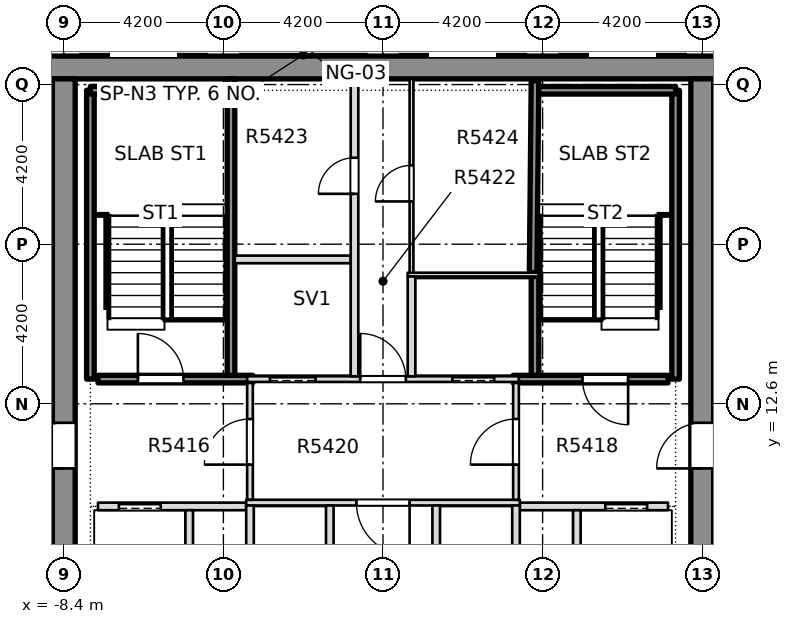
"""IFC4 building model, lengths in metres.
Left out: names, types, materials, properties, quantities, classifications, styles, units other than length and angle.
Written with IfcOpenShell. Run it as: python <this file> out.ifc"""

import sys

from ifc_helpers import new_model, si_unit, direction, frame, frame_2d, origin, place, context, subcontext, project, spatial, rectangle, extrude, element, fill, save


model = new_model("IFC4")
c1 = context("Model", 3, precision=1e-05, world=origin(), true_north=direction((0.0, 1.0)))
c2 = subcontext(c1, "Body", "Model", "MODEL_VIEW")
j1 = project(units=[si_unit("LENGTHUNIT", "METRE"), si_unit("PLANEANGLEUNIT", "RADIAN")], contexts=[c1])
p1 = place(None, origin())
s1 = spatial("IfcSite", under=j1, at=p1, CompositionType="ELEMENT")
p2 = place(p1, origin())
s2 = spatial("IfcBuilding", under=s1, at=p2, CompositionType="ELEMENT")
p3 = place(p2, frame((0.0, 0.0, 206.6)))
s3 = spatial("IfcBuildingStorey", under=s2, at=p3, CompositionType="ELEMENT", Elevation=206.6)
p4 = place(p3, frame((-12.0, 21.45, -0.4), z_axis=(0.0, 0.0, 1.0), x_axis=(1.0, 0.0, 0.0)))
e1 = element("IfcWall", 1, at=p4, inside=s3, PredefinedType="SHEAR", context=c2, shape_type="SweptSolid", body=[
    extrude(rectangle(XDim=24.0, YDim=0.6, at=frame_2d((12.0, 0.0))), origin(), (0.0, 0.0, 1.0), 3.45),
])
p5 = place(p3, frame((-8.4, -7.8, -0.4), z_axis=(0.0, 0.0, 1.0), x_axis=(0.0, 1.0, 0.0)))
e2 = element("IfcWall", 2, at=p5, inside=s3, PredefinedType="SHEAR", context=c2, shape_type="SweptSolid", body=[
    extrude(rectangle(XDim=28.95, YDim=0.6, at=frame_2d((14.475, 0.0))), origin(), (0.0, 0.0, 1.0), 3.45),
])
p6 = place(p5, frame((18.7, 0.0, 0.4)))
e3 = element("IfcOpeningElement", 3, at=p6, cuts=e2, PredefinedType="OPENING", context=c2, shape_type="SweptSolid", body=[
    extrude(rectangle(XDim=1.2, YDim=2.1, at=frame_2d((0.6, 1.05))), frame((0.0, 0.31, 0.0), z_axis=(0.0, -1.0, 0.0), x_axis=(1.0, 0.0, 0.0)), (0.0, 0.0, 1.0), 0.62),
])
p7 = place(p3, frame((8.4, -7.8, -0.4), z_axis=(0.0, 0.0, 1.0), x_axis=(0.0, 1.0, 0.0)))
e4 = element("IfcWall", 4, at=p7, inside=s3, PredefinedType="SHEAR", context=c2, shape_type="SweptSolid", body=[
    extrude(rectangle(XDim=28.95, YDim=0.6, at=frame_2d((14.475, 0.0))), origin(), (0.0, 0.0, 1.0), 3.45),
])
p8 = place(p7, frame((18.7, 0.0, 0.4)))
e5 = element("IfcOpeningElement", 5, at=p8, cuts=e4, PredefinedType="OPENING", context=c2, shape_type="SweptSolid", body=[
    extrude(rectangle(XDim=1.2, YDim=2.1, at=frame_2d((0.6, 1.05))), frame((0.0, 0.31, 0.0), z_axis=(0.0, -1.0, 0.0), x_axis=(1.0, 0.0, 0.0)), (0.0, 0.0, 1.0), 0.62),
])
p9 = place(p3, frame((-7.5, 9.9, 0.0), z_axis=(0.0, 0.0, 1.0), x_axis=(1.0, 0.0, 0.0)))
e6 = element("IfcWall", 6, at=p9, inside=s3, PredefinedType="PARTITIONING", context=c2, shape_type="SweptSolid", body=[
    extrude(rectangle(XDim=3.9, YDim=0.2, at=frame_2d((1.95, 0.0))), origin(), (0.0, 0.0, 1.0), 3.05),
])
p10 = place(p9, frame((0.55, 0.0, 0.0)))
e7 = element("IfcOpeningElement", 7, at=p10, cuts=e6, PredefinedType="OPENING", context=c2, shape_type="SweptSolid", body=[
    extrude(rectangle(XDim=1.1, YDim=2.1, at=frame_2d((0.55, 1.05))), frame((0.0, 0.11, 0.0), z_axis=(0.0, -1.0, 0.0), x_axis=(1.0, 0.0, 0.0)), (0.0, 0.0, 1.0), 0.22),
])
p11 = place(p3, frame((3.6, 9.9, 0.0), z_axis=(0.0, 0.0, 1.0), x_axis=(1.0, 0.0, 0.0)))
e8 = element("IfcWall", 8, at=p11, inside=s3, PredefinedType="PARTITIONING", context=c2, shape_type="SweptSolid", body=[
    extrude(rectangle(XDim=3.9, YDim=0.2, at=frame_2d((1.95, 0.0))), origin(), (0.0, 0.0, 1.0), 3.05),
])
p12 = place(p11, frame((2.25, 0.0, 0.0)))
e9 = element("IfcOpeningElement", 9, at=p12, cuts=e8, PredefinedType="OPENING", context=c2, shape_type="SweptSolid", body=[
    extrude(rectangle(XDim=1.1, YDim=2.1, at=frame_2d((0.55, 1.05))), frame((0.0, 0.11, 0.0), z_axis=(0.0, -1.0, 0.0), x_axis=(1.0, 0.0, 0.0)), (0.0, 0.0, 1.0), 0.22),
])
p13 = place(p3, frame((-3.6, 10.0, 0.0), z_axis=(0.0, 0.0, 1.0), x_axis=(1.0, 0.0, 0.0)))
e10 = element("IfcWall", 10, at=p13, inside=s3, PredefinedType="PARTITIONING", context=c2, shape_type="SweptSolid", body=[
    extrude(rectangle(XDim=7.2, YDim=0.15, at=frame_2d((3.6, 0.0))), origin(), (0.0, 0.0, 1.0), 3.05),
])
p14 = place(p13, frame((2.9, 0.0, 0.0)))
e11 = element("IfcOpeningElement", 11, at=p14, cuts=e10, PredefinedType="OPENING", context=c2, shape_type="SweptSolid", body=[
    extrude(rectangle(XDim=1.4, YDim=2.1, at=frame_2d((0.7, 1.05))), frame((0.0, 0.085, 0.0), z_axis=(0.0, -1.0, 0.0), x_axis=(1.0, 0.0, 0.0)), (0.0, 0.0, 1.0), 0.17),
])
p15 = place(p3, frame((-7.5, 13.25, 0.0), z_axis=(0.0, 0.0, 1.0), x_axis=(1.0, 0.0, 0.0)))
e12 = element("IfcWall", 12, at=p15, inside=s3, PredefinedType="SOLIDWALL", context=c2, shape_type="SweptSolid", body=[
    extrude(rectangle(XDim=4.075, YDim=0.2, at=frame_2d((2.038, 0.0))), origin(), (0.0, 0.0, 1.0), 3.05),
])
p16 = place(p15, frame((1.05, 0.0, 0.0)))
e13 = element("IfcOpeningElement", 13, at=p16, cuts=e12, PredefinedType="OPENING", context=c2, shape_type="SweptSolid", body=[
    extrude(rectangle(XDim=1.2, YDim=2.1, at=frame_2d((0.6, 1.05))), frame((0.0, 0.11, 0.0), z_axis=(0.0, -1.0, 0.0), x_axis=(1.0, 0.0, 0.0)), (0.0, 0.0, 1.0), 0.22),
])
p17 = place(p3, frame((-3.575, 13.25, 0.0), z_axis=(0.0, 0.0, 1.0), x_axis=(1.0, 0.0, 0.0)))
e14 = element("IfcWall", 14, at=p17, inside=s3, PredefinedType="PARTITIONING", context=c2, shape_type="SweptSolid", body=[
    extrude(rectangle(XDim=7.15, YDim=0.15, at=frame_2d((3.575, 0.0))), origin(), (0.0, 0.0, 1.0), 3.05),
])
p18 = place(p17, frame((0.6, 0.0, 0.0)))
e15 = element("IfcOpeningElement", 15, at=p18, cuts=e14, PredefinedType="OPENING", context=c2, shape_type="SweptSolid", body=[
    extrude(rectangle(XDim=1.2, YDim=2.1, at=frame_2d((0.6, 1.05))), frame((0.0, 0.085, 0.0), z_axis=(0.0, -1.0, 0.0), x_axis=(1.0, 0.0, 0.0)), (0.0, 0.0, 1.0), 0.17),
])
p19 = place(p17, frame((5.4, 0.0, 0.0)))
e16 = element("IfcOpeningElement", 16, at=p19, cuts=e14, PredefinedType="OPENING", context=c2, shape_type="SweptSolid", body=[
    extrude(rectangle(XDim=1.1, YDim=2.1, at=frame_2d((0.55, 1.05))), frame((0.0, 0.085, 0.0), z_axis=(0.0, -1.0, 0.0), x_axis=(1.0, 0.0, 0.0)), (0.0, 0.0, 1.0), 0.17),
])
p20 = place(p17, frame((2.975, 0.0, 0.0)))
e17 = element("IfcOpeningElement", 17, at=p20, cuts=e14, PredefinedType="OPENING", context=c2, shape_type="SweptSolid", body=[
    extrude(rectangle(XDim=1.2, YDim=2.1, at=frame_2d((0.6, 1.05))), frame((0.0, 0.085, 0.0), z_axis=(0.0, -1.0, 0.0), x_axis=(1.0, 0.0, 0.0)), (0.0, 0.0, 1.0), 0.17),
])
p21 = place(p3, frame((3.425, 13.25, 0.0), z_axis=(0.0, 0.0, 1.0), x_axis=(1.0, 0.0, 0.0)))
e18 = element("IfcWall", 18, at=p21, inside=s3, PredefinedType="SOLIDWALL", context=c2, shape_type="SweptSolid", body=[
    extrude(rectangle(XDim=4.075, YDim=0.2, at=frame_2d((2.038, 0.0))), origin(), (0.0, 0.0, 1.0), 3.05),
])
p22 = place(p21, frame((1.825, 0.0, 0.0)))
e19 = element("IfcOpeningElement", 19, at=p22, cuts=e18, PredefinedType="OPENING", context=c2, shape_type="SweptSolid", body=[
    extrude(rectangle(XDim=1.2, YDim=2.1, at=frame_2d((0.6, 1.05))), frame((0.0, 0.11, 0.0), z_axis=(0.0, -1.0, 0.0), x_axis=(1.0, 0.0, 0.0)), (0.0, 0.0, 1.0), 0.22),
])
p23 = place(p3, frame((0.65, 16.0, 0.0), z_axis=(0.0, 0.0, 1.0), x_axis=(1.0, 0.0, 0.0)))
e20 = element("IfcWall", 20, at=p23, inside=s3, PredefinedType="PARTITIONING", context=c2, shape_type="SweptSolid", body=[
    extrude(rectangle(XDim=3.45, YDim=0.1, at=frame_2d((1.725, 0.0))), origin(), (0.0, 0.0, 1.0), 3.05),
])
p24 = place(p3, frame((-3.9, 16.4, 0.0), z_axis=(0.0, 0.0, 1.0), x_axis=(1.0, 0.0, 0.0)))
e21 = element("IfcWall", 21, at=p24, inside=s3, PredefinedType="PARTITIONING", context=c2, shape_type="SweptSolid", body=[
    extrude(rectangle(XDim=3.05, YDim=0.2, at=frame_2d((1.525, 0.0))), origin(), (0.0, 0.0, 1.0), 3.05),
])
p25 = place(p3, frame((-5.1, 7.075, 0.0), z_axis=(0.0, 0.0, 1.0), x_axis=(0.0, 1.0, 0.0)))
e22 = element("IfcWall", 22, at=p25, inside=s3, PredefinedType="PARTITIONING", context=c2, shape_type="SweptSolid", body=[
    extrude(rectangle(XDim=2.725, YDim=0.2, at=frame_2d((1.363, 0.0))), origin(), (0.0, 0.0, 1.0), 3.05),
])
p26 = place(p3, frame((-4.0, 13.35, 0.0), z_axis=(0.0, 0.0, 1.0), x_axis=(0.0, 1.0, 0.0)))
e23 = element("IfcWall", 23, at=p26, inside=s3, PredefinedType="SOLIDWALL", context=c2, shape_type="SweptSolid", body=[
    extrude(rectangle(XDim=7.799, YDim=0.2, at=frame_2d((3.899, 0.0))), origin(), (0.0, 0.0, 1.0), 3.05),
])
p27 = place(p3, frame((-3.5, 7.075, 0.0), z_axis=(0.0, 0.0, 1.0), x_axis=(0.0, 1.0, 0.0)))
e24 = element("IfcWall", 24, at=p27, inside=s3, PredefinedType="PARTITIONING", context=c2, shape_type="SweptSolid", body=[
    extrude(rectangle(XDim=2.85, YDim=0.2, at=frame_2d((1.425, 0.0))), origin(), (0.0, 0.0, 1.0), 3.05),
])
p28 = place(p3, frame((-3.5, 10.075, 0.0), z_axis=(0.0, 0.0, 1.0), x_axis=(0.0, 1.0, 0.0)))
e25 = element("IfcWall", 25, at=p28, inside=s3, PredefinedType="PARTITIONING", context=c2, shape_type="SweptSolid", body=[
    extrude(rectangle(XDim=3.075, YDim=0.15, at=frame_2d((1.538, 0.0))), origin(), (0.0, 0.0, 1.0), 3.05),
])
p29 = place(p28, frame((0.925, 0.0, 0.0)))
e26 = element("IfcOpeningElement", 26, at=p29, cuts=e25, PredefinedType="OPENING", context=c2, shape_type="SweptSolid", body=[
    extrude(rectangle(XDim=1.2, YDim=2.1, at=frame_2d((0.6, 1.05))), frame((0.0, 0.085, 0.0), z_axis=(0.0, -1.0, 0.0), x_axis=(1.0, 0.0, 0.0)), (0.0, 0.0, 1.0), 0.17),
])
p30 = place(p3, frame((-1.4, 7.075, 0.0), z_axis=(0.0, 0.0, 1.0), x_axis=(0.0, 1.0, 0.0)))
e27 = element("IfcWall", 27, at=p30, inside=s3, PredefinedType="PARTITIONING", context=c2, shape_type="SweptSolid", body=[
    extrude(rectangle(XDim=2.85, YDim=0.2, at=frame_2d((1.425, 0.0))), origin(), (0.0, 0.0, 1.0), 3.05),
])
p31 = place(p3, frame((-0.75, 13.325, 0.0), z_axis=(0.0, 0.0, 1.0), x_axis=(0.0, 1.0, 0.0)))
e28 = element("IfcWall", 28, at=p31, inside=s3, PredefinedType="PARTITIONING", context=c2, shape_type="SweptSolid", body=[
    extrude(rectangle(XDim=7.824, YDim=0.2, at=frame_2d((3.912, 0.0))), origin(), (0.0, 0.0, 1.0), 3.05),
])
p32 = place(p31, frame((4.8, 0.0, 0.0)))
e29 = element("IfcOpeningElement", 29, at=p32, cuts=e28, PredefinedType="OPENING", context=c2, shape_type="SweptSolid", body=[
    extrude(rectangle(XDim=0.95, YDim=2.1, at=frame_2d((0.475, 1.05))), frame((0.0, 0.11, 0.0), z_axis=(0.0, -1.0, 0.0), x_axis=(1.0, 0.0, 0.0)), (0.0, 0.0, 1.0), 0.22),
])
p33 = place(p3, frame((0.75, 13.325, 0.0), z_axis=(0.0, 0.0, 1.0), x_axis=(0.0, 1.0, 0.0)))
e30 = element("IfcWall", 30, at=p33, inside=s3, PredefinedType="PARTITIONING", context=c2, shape_type="SweptSolid", body=[
    extrude(rectangle(XDim=2.625, YDim=0.2, at=frame_2d((1.312, 0.0))), origin(), (0.0, 0.0, 1.0), 3.05),
])
p34 = place(p3, frame((0.75, 16.05, 0.0), z_axis=(0.0, 0.0, 1.0), x_axis=(0.0, 1.0, 0.0)))
e31 = element("IfcWall", 31, at=p34, inside=s3, PredefinedType="PARTITIONING", context=c2, shape_type="SweptSolid", body=[
    extrude(rectangle(XDim=5.099, YDim=0.1, at=frame_2d((2.549, 0.0))), origin(), (0.0, 0.0, 1.0), 3.05),
])
p35 = place(p34, frame((1.875, 0.0, 0.0)))
e32 = element("IfcOpeningElement", 32, at=p35, cuts=e31, PredefinedType="OPENING", context=c2, shape_type="SweptSolid", body=[
    extrude(rectangle(XDim=0.95, YDim=2.1, at=frame_2d((0.475, 1.05))), frame((0.0, 0.06, 0.0), z_axis=(0.0, -1.0, 0.0), x_axis=(1.0, 0.0, 0.0)), (0.0, 0.0, 1.0), 0.12),
])
for number, where, z_axis, x_axis in (
    (33, (1.4, 7.075, 0.0), (0.0, 0.0, 1.0), (0.0, 1.0, 0.0)),
    (34, (3.5, 7.075, 0.0), (0.0, 0.0, 1.0), (0.0, 1.0, 0.0)),
):
    element("IfcWall", number, at=place(p3, frame(where, z_axis=z_axis, x_axis=x_axis)), inside=s3, PredefinedType="PARTITIONING", context=c2, shape_type="SweptSolid", body=[
        extrude(rectangle(XDim=2.85, YDim=0.2, at=frame_2d((1.425, 0.0))), origin(), (0.0, 0.0, 1.0), 3.05),
    ])
p36 = place(p3, frame((3.5, 10.075, 0.0), z_axis=(0.0, 0.0, 1.0), x_axis=(0.0, 1.0, 0.0)))
e35 = element("IfcWall", 35, at=p36, inside=s3, PredefinedType="PARTITIONING", context=c2, shape_type="SweptSolid", body=[
    extrude(rectangle(XDim=3.075, YDim=0.15, at=frame_2d((1.538, 0.0))), origin(), (0.0, 0.0, 1.0), 3.05),
])
p37 = place(p36, frame((0.925, 0.0, 0.0)))
e36 = element("IfcOpeningElement", 36, at=p37, cuts=e35, PredefinedType="OPENING", context=c2, shape_type="SweptSolid", body=[
    extrude(rectangle(XDim=1.2, YDim=2.1, at=frame_2d((0.6, 1.05))), frame((0.0, 0.085, 0.0), z_axis=(0.0, -1.0, 0.0), x_axis=(1.0, 0.0, 0.0)), (0.0, 0.0, 1.0), 0.17),
])
p38 = place(p3, frame((4.0, 13.35, 0.0), z_axis=(0.0, 0.0, 1.0), x_axis=(0.0, 1.0, 0.0)))
e37 = element("IfcWall", 37, at=p38, inside=s3, PredefinedType="SOLIDWALL", context=c2, shape_type="SweptSolid", body=[
    extrude(rectangle(XDim=2.6, YDim=0.2, at=frame_2d((1.3, 0.0))), origin(), (0.0, 0.0, 1.0), 3.05),
])
p39 = place(p3, frame((3.95, 16.05, 0.0), z_axis=(0.0, 0.0, 1.0), x_axis=(0.009911993103, 0.99995087499, 0.0)))
e38 = element("IfcWall", 38, at=p39, inside=s3, PredefinedType="SOLIDWALL", context=c2, shape_type="SweptSolid", body=[
    extrude(rectangle(XDim=5.049, YDim=0.2, at=frame_2d((2.525, 0.0))), origin(), (0.0, 0.0, 1.0), 3.05),
])
p40 = place(p3, frame((5.1, 7.075, 0.0), z_axis=(0.0, 0.0, 1.0), x_axis=(0.0, 1.0, 0.0)))
e39 = element("IfcWall", 39, at=p40, inside=s3, PredefinedType="PARTITIONING", context=c2, shape_type="SweptSolid", body=[
    extrude(rectangle(XDim=2.725, YDim=0.2, at=frame_2d((1.363, 0.0))), origin(), (0.0, 0.0, 1.0), 3.05),
])
p41 = place(p3, frame((-7.7, 13.25, 0.0), z_axis=(0.0, 0.0, 1.0), x_axis=(0.0, 1.0, 0.0)))
e40 = element("IfcWall", 40, at=p41, inside=s3, PredefinedType="SOLIDWALL", context=c2, shape_type="SweptSolid", body=[
    extrude(rectangle(XDim=7.6, YDim=0.2, at=frame_2d((3.8, 0.0))), origin(), (0.0, 0.0, 1.0), 3.05),
])
p42 = place(p3, frame((-7.7, 20.85, 0.0), z_axis=(0.0, 0.0, 1.0), x_axis=(1.0, 0.0, 0.0)))
e41 = element("IfcWall", 41, at=p42, inside=s3, PredefinedType="SOLIDWALL", context=c2, shape_type="SweptSolid", body=[
    extrude(rectangle(XDim=3.55, YDim=0.2, at=frame_2d((1.775, 0.0))), origin(), (0.0, 0.0, 1.0), 3.05),
])
p43 = place(p3, frame((7.7, 13.25, 0.0), z_axis=(0.0, 0.0, 1.0), x_axis=(0.0, 1.0, 0.0)))
e42 = element("IfcWall", 42, at=p43, inside=s3, PredefinedType="SOLIDWALL", context=c2, shape_type="SweptSolid", body=[
    extrude(rectangle(XDim=7.6, YDim=0.2, at=frame_2d((3.8, 0.0))), origin(), (0.0, 0.0, 1.0), 3.05),
])
p44 = place(p3, frame((4.1, 20.85, 0.0), z_axis=(0.0, 0.0, 1.0), x_axis=(1.0, 0.0, 0.0)))
e43 = element("IfcWall", 43, at=p44, inside=s3, PredefinedType="SOLIDWALL", context=c2, shape_type="SweptSolid", body=[
    extrude(rectangle(XDim=3.6, YDim=0.2, at=frame_2d((1.8, 0.0))), origin(), (0.0, 0.0, 1.0), 3.05),
])
p45 = place(p16, origin())
e44 = element("IfcDoor", 44, at=p45, inside=s3, OperationType="SINGLE_SWING_LEFT", PredefinedType="DOOR", context=c2, shape_type="SweptSolid", body=[
    extrude(rectangle(XDim=1.2, YDim=2.1, at=frame_2d((0.6, 1.05))), frame((0.0, 0.025, 0.0), z_axis=(0.0, -1.0, 0.0), x_axis=(1.0, 0.0, 0.0)), (0.0, 0.0, 1.0), 0.05),
])
fill(e13, e44)
p46 = place(p10, origin())
e45 = element("IfcDoor", 45, at=p46, inside=s3, OperationType="SLIDING_TO_RIGHT", PredefinedType="DOOR", context=c2, shape_type="SweptSolid", body=[
    extrude(rectangle(XDim=1.1, YDim=2.1, at=frame_2d((0.55, 1.05))), frame((0.0, 0.025, 0.0), z_axis=(0.0, -1.0, 0.0), x_axis=(1.0, 0.0, 0.0)), (0.0, 0.0, 1.0), 0.05),
])
fill(e7, e45)
p47 = place(p22, origin())
e46 = element("IfcDoor", 46, at=p47, inside=s3, OperationType="SINGLE_SWING_RIGHT", PredefinedType="DOOR", context=c2, shape_type="SweptSolid", body=[
    extrude(rectangle(XDim=1.2, YDim=2.1, at=frame_2d((0.6, 1.05))), frame((0.0, 0.025, 0.0), z_axis=(0.0, -1.0, 0.0), x_axis=(1.0, 0.0, 0.0)), (0.0, 0.0, 1.0), 0.05),
])
fill(e19, e46)
p48 = place(p12, origin())
e47 = element("IfcDoor", 47, at=p48, inside=s3, OperationType="SLIDING_TO_LEFT", PredefinedType="DOOR", context=c2, shape_type="SweptSolid", body=[
    extrude(rectangle(XDim=1.1, YDim=2.1, at=frame_2d((0.55, 1.05))), frame((0.0, 0.025, 0.0), z_axis=(0.0, -1.0, 0.0), x_axis=(1.0, 0.0, 0.0)), (0.0, 0.0, 1.0), 0.05),
])
fill(e9, e47)
p49 = place(p14, origin())
e48 = element("IfcDoor", 48, at=p49, inside=s3, OperationType="SINGLE_SWING_RIGHT", PredefinedType="DOOR", context=c2, shape_type="SweptSolid", body=[
    extrude(rectangle(XDim=1.4, YDim=2.1, at=frame_2d((0.7, 1.05))), frame((0.0, 0.025, 0.0), z_axis=(0.0, -1.0, 0.0), x_axis=(1.0, 0.0, 0.0)), (0.0, 0.0, 1.0), 0.05),
])
fill(e11, e48)
p50 = place(p18, origin())
e49 = element("IfcDoor", 49, at=p50, inside=s3, OperationType="SLIDING_TO_RIGHT", PredefinedType="DOOR", context=c2, shape_type="SweptSolid", body=[
    extrude(rectangle(XDim=1.2, YDim=2.1, at=frame_2d((0.6, 1.05))), frame((0.0, 0.025, 0.0), z_axis=(0.0, -1.0, 0.0), x_axis=(1.0, 0.0, 0.0)), (0.0, 0.0, 1.0), 0.05),
])
fill(e15, e49)
p51 = place(p19, origin())
e50 = element("IfcDoor", 50, at=p51, inside=s3, OperationType="SLIDING_TO_LEFT", PredefinedType="DOOR", context=c2, shape_type="SweptSolid", body=[
    extrude(rectangle(XDim=1.1, YDim=2.1, at=frame_2d((0.55, 1.05))), frame((0.0, 0.025, 0.0), z_axis=(0.0, -1.0, 0.0), x_axis=(1.0, 0.0, 0.0)), (0.0, 0.0, 1.0), 0.05),
])
fill(e16, e50)
p52 = place(p20, origin())
e51 = element("IfcDoor", 51, at=p52, inside=s3, OperationType="SINGLE_SWING_RIGHT", PredefinedType="DOOR", context=c2, shape_type="SweptSolid", body=[
    extrude(rectangle(XDim=1.2, YDim=2.1, at=frame_2d((0.6, 1.05))), frame((0.0, 0.025, 0.0), z_axis=(0.0, -1.0, 0.0), x_axis=(1.0, 0.0, 0.0)), (0.0, 0.0, 1.0), 0.05),
])
fill(e17, e51)
p53 = place(p32, origin())
e52 = element("IfcDoor", 52, at=p53, inside=s3, OperationType="SINGLE_SWING_RIGHT", PredefinedType="DOOR", context=c2, shape_type="SweptSolid", body=[
    extrude(rectangle(XDim=0.95, YDim=2.1, at=frame_2d((0.475, 1.05))), frame((0.0, 0.025, 0.0), z_axis=(0.0, -1.0, 0.0), x_axis=(1.0, 0.0, 0.0)), (0.0, 0.0, 1.0), 0.05),
])
fill(e29, e52)
p54 = place(p35, origin())
e53 = element("IfcDoor", 53, at=p54, inside=s3, OperationType="SINGLE_SWING_LEFT", PredefinedType="DOOR", context=c2, shape_type="SweptSolid", body=[
    extrude(rectangle(XDim=0.95, YDim=2.1, at=frame_2d((0.475, 1.05))), frame((0.0, 0.025, 0.0), z_axis=(0.0, -1.0, 0.0), x_axis=(1.0, 0.0, 0.0)), (0.0, 0.0, 1.0), 0.05),
])
fill(e32, e53)
p55 = place(p29, origin())
e54 = element("IfcDoor", 54, at=p55, inside=s3, OperationType="SINGLE_SWING_RIGHT", PredefinedType="DOOR", context=c2, shape_type="SweptSolid", body=[
    extrude(rectangle(XDim=1.2, YDim=2.1, at=frame_2d((0.6, 1.05))), frame((0.0, 0.025, 0.0), z_axis=(0.0, -1.0, 0.0), x_axis=(1.0, 0.0, 0.0)), (0.0, 0.0, 1.0), 0.05),
])
fill(e26, e54)
p56 = place(p37, origin())
e55 = element("IfcDoor", 55, at=p56, inside=s3, OperationType="SINGLE_SWING_LEFT", PredefinedType="DOOR", context=c2, shape_type="SweptSolid", body=[
    extrude(rectangle(XDim=1.2, YDim=2.1, at=frame_2d((0.6, 1.05))), frame((0.0, 0.025, 0.0), z_axis=(0.0, -1.0, 0.0), x_axis=(1.0, 0.0, 0.0)), (0.0, 0.0, 1.0), 0.05),
])
fill(e36, e55)
p57 = place(p6, origin())
e56 = element("IfcDoor", 56, at=p57, inside=s3, OperationType="SINGLE_SWING_LEFT", PredefinedType="DOOR", context=c2, shape_type="SweptSolid", body=[
    extrude(rectangle(XDim=1.2, YDim=2.1, at=frame_2d((0.6, 1.05))), frame((0.0, 0.025, 0.0), z_axis=(0.0, -1.0, 0.0), x_axis=(1.0, 0.0, 0.0)), (0.0, 0.0, 1.0), 0.05),
])
fill(e3, e56)
p58 = place(p8, origin())
e57 = element("IfcDoor", 57, at=p58, inside=s3, OperationType="SINGLE_SWING_LEFT", PredefinedType="DOOR", context=c2, shape_type="SweptSolid", body=[
    extrude(rectangle(XDim=1.2, YDim=2.1, at=frame_2d((0.6, 1.05))), frame((0.0, 0.025, 0.0), z_axis=(0.0, -1.0, 0.0), x_axis=(1.0, 0.0, 0.0)), (0.0, 0.0, 1.0), 0.05),
])
fill(e5, e57)
save(model, sys.argv[1])
